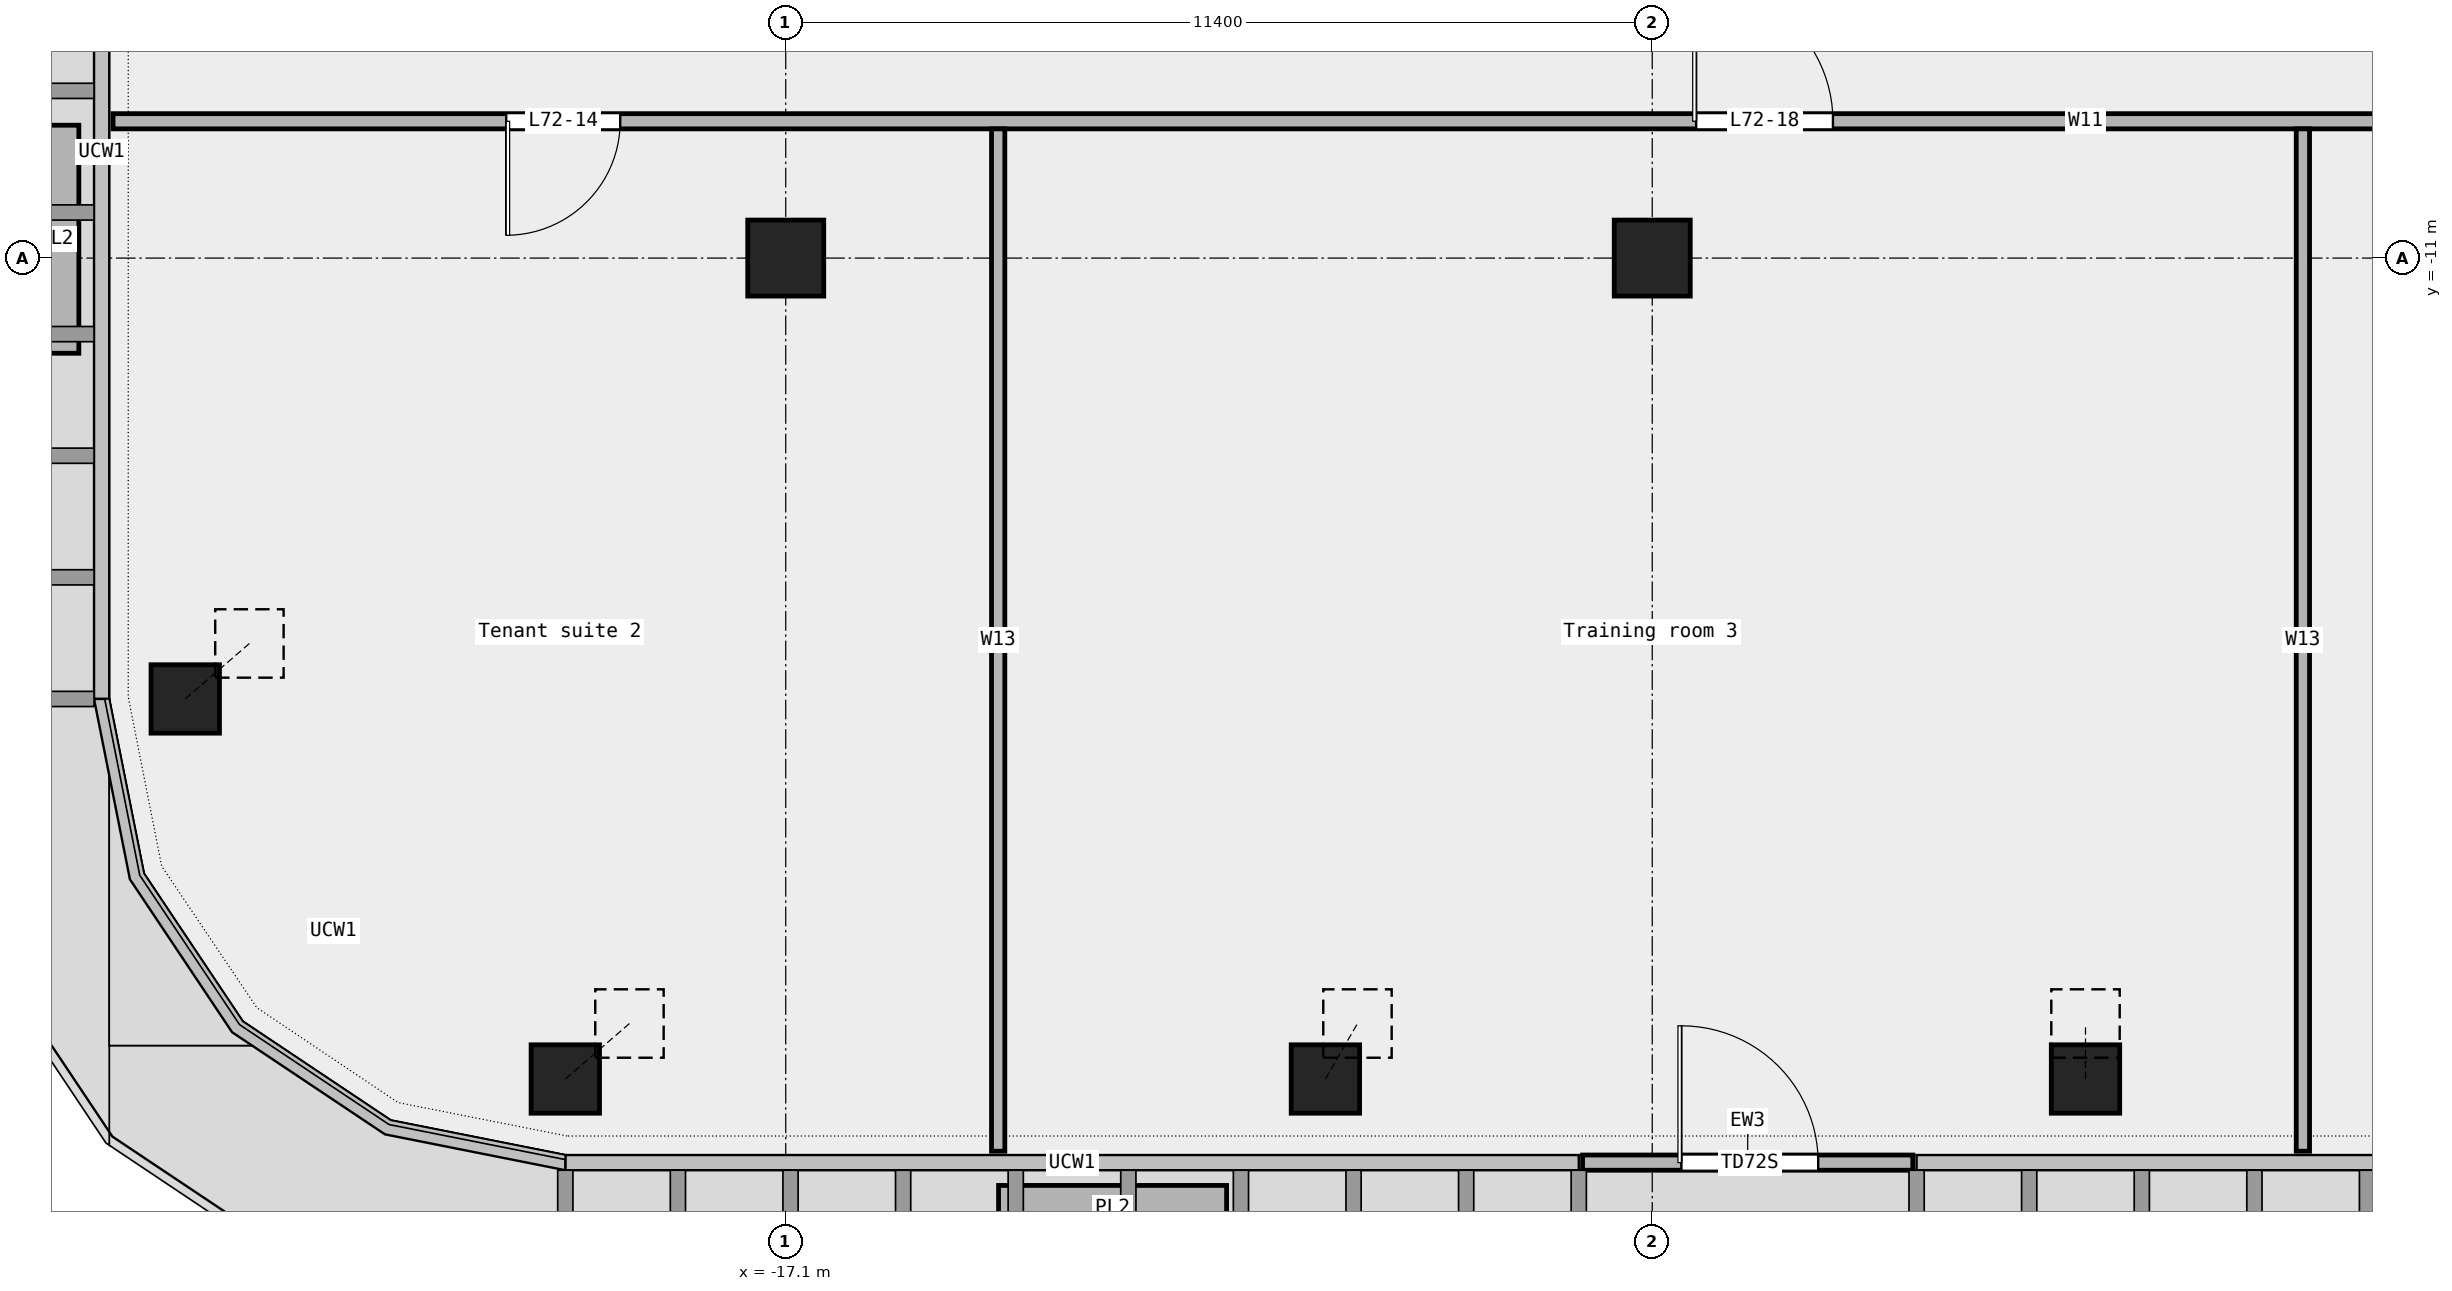
"""IFC4 building model, lengths in metres.
Left out: names, types, materials, properties, quantities, classifications, styles, units other than length and angle.
Written with IfcOpenShell. Run it as: python <this file> out.ifc"""

import sys

from ifc_helpers import new_model, si_unit, direction, frame, frame_2d, origin, origin_2d, place, context, subcontext, project, spatial, rectangle, extrude, element, fill, save


model = new_model("IFC4")
c1 = context("Model", 3, precision=1e-05, world=origin(), true_north=direction((0.0, 1.0)))
c2 = subcontext(c1, "Body", "Model", "MODEL_VIEW")
j1 = project(units=[si_unit("LENGTHUNIT", "METRE"), si_unit("PLANEANGLEUNIT", "RADIAN")], contexts=[c1])
p1 = place(None, origin())
s1 = spatial("IfcSite", under=j1, at=p1, CompositionType="ELEMENT")
p2 = place(p1, origin())
s2 = spatial("IfcBuilding", under=s1, at=p2, CompositionType="ELEMENT")
p3 = place(p2, frame((0.0, 0.0, 329.4)))
s3 = spatial("IfcBuildingStorey", under=s2, at=p3, CompositionType="ELEMENT", Elevation=329.4)
p4 = place(p3, frame((-20.0, -21.8, 0.0), z_axis=(0.221120003964, 0.191249294721, 0.956310436582), x_axis=(-0.654172229665, 0.756345618044, 0.0)))
e1 = element("IfcColumn", 1, at=p4, inside=s3, PredefinedType="COLUMN", context=c2, shape_type="SweptSolid", body=[
    extrude(rectangle(XDim=0.9, YDim=0.9, at=origin_2d()), origin(), (0.0, 0.0, 1.0), 3.817),
])
p5 = place(p3, frame((-10.0, -21.8, 0.0), z_axis=(0.112612491067, 0.194856104335, 0.974345690943), x_axis=(-0.8658093198, 0.500374081811, 0.0)))
e2 = element("IfcColumn", 2, at=p5, inside=s3, PredefinedType="COLUMN", context=c2, shape_type="SweptSolid", body=[
    extrude(rectangle(XDim=0.9, YDim=0.9, at=origin_2d()), origin(), (0.0, 0.0, 1.0), 3.746),
])
p6 = place(p3, frame((0.0, -21.8, 0.0), z_axis=(0.0, 0.196103522341, 0.980583198166), x_axis=(-1.0, 0.0, 0.0)))
e3 = element("IfcColumn", 3, at=p6, inside=s3, PredefinedType="COLUMN", context=c2, shape_type="SweptSolid", body=[
    extrude(rectangle(XDim=0.9, YDim=0.9, at=origin_2d()), origin(), (0.0, 0.0, 1.0), 3.722),
])
p7 = place(p3, frame((-25.0, -16.8, 0.0), z_axis=(0.221120003964, 0.191249294721, 0.956310436582), x_axis=(-0.654172229665, 0.756345618044, 0.0)))
e4 = element("IfcColumn", 4, at=p7, inside=s3, PredefinedType="COLUMN", context=c2, shape_type="SweptSolid", body=[
    extrude(rectangle(XDim=0.9, YDim=0.9, at=origin_2d()), origin(), (0.0, 0.0, 1.0), 3.817),
])
for number, where, z_axis, x_axis in (
    (5, (-17.1, -11.0, 0.0), (0.0, 0.0, 1.0), (1.0, 0.0, 0.0)),
    (6, (-5.7, -11.0, 0.0), (0.0, 0.0, 1.0), (1.0, 0.0, 0.0)),
):
    element("IfcColumn", number, at=place(p3, frame(where, z_axis=z_axis, x_axis=x_axis)), inside=s3, PredefinedType="COLUMN", context=c2, shape_type="SweptSolid", body=[
        extrude(rectangle(XDim=1.0, YDim=1.0, at=origin_2d()), origin(), (0.0, 0.0, 1.0), 3.65),
    ])
p8 = place(p3, frame((-6.617, -22.9, 0.0), z_axis=(0.0, 0.0, 1.0), x_axis=(1.0, 0.0, 0.0)))
e7 = element("IfcWall", 7, at=p8, inside=s3, PredefinedType="STANDARD", context=c2, shape_type="SweptSolid", body=[
    extrude(rectangle(XDim=4.344, YDim=0.2, at=frame_2d((2.172, 0.0))), origin(), (0.0, 0.0, 1.0), 3.65),
])
p9 = place(p8, frame((1.3, 0.0, 0.0)))
e8 = element("IfcOpeningElement", 8, at=p9, cuts=e7, PredefinedType="OPENING", context=c2, shape_type="SweptSolid", body=[
    extrude(rectangle(XDim=1.8, YDim=2.4, at=frame_2d((0.9, 1.2))), frame((0.0, 0.112, 0.0), z_axis=(0.0, -1.0, 0.0), x_axis=(1.0, 0.0, 0.0)), (0.0, 0.0, 1.0), 0.224),
])
for number, where, z_axis, x_axis in (
    (9, (-14.3, -23.5, 0.0), (0.0, 0.0, 1.0), (1.0, 0.0, 0.0)),
    (10, (-26.7, -9.252, 0.0), (0.0, 0.0, 1.0), (0.0, -1.0, 0.0)),
):
    element("IfcWall", number, at=place(p3, frame(where, z_axis=z_axis, x_axis=x_axis)), inside=s3, PredefinedType="STANDARD", context=c2, shape_type="SweptSolid", body=[
        extrude(rectangle(XDim=3.0, YDim=0.6, at=frame_2d((1.5, 0.0))), origin(), (0.0, 0.0, 1.0), 0.7),
    ])
p10 = place(p3, frame((-25.95, -9.2, 0.0), z_axis=(0.0, 0.0, 1.0), x_axis=(1.0, 0.0, 0.0)))
e11 = element("IfcWall", 11, at=p10, inside=s3, PredefinedType="PARTITIONING", context=c2, shape_type="SweptSolid", body=[
    extrude(rectangle(XDim=51.9, YDim=0.2, at=frame_2d((25.95, 0.0))), origin(), (0.0, 0.0, 1.0), 3.65),
])
p11 = place(p10, frame((39.355, 0.0, 0.0)))
e12 = element("IfcOpeningElement", 12, at=p11, cuts=e11, PredefinedType="OPENING", context=c2, shape_type="SweptSolid", body=[
    extrude(rectangle(XDim=1.8, YDim=2.1, at=frame_2d((0.9, 1.05))), frame((0.0, 0.112, 0.0), z_axis=(0.0, -1.0, 0.0), x_axis=(1.0, 0.0, 0.0)), (0.0, 0.0, 1.0), 0.224),
])
p12 = place(p10, frame((5.173, 0.0, 0.0)))
e13 = element("IfcOpeningElement", 13, at=p12, cuts=e11, PredefinedType="OPENING", context=c2, shape_type="SweptSolid", body=[
    extrude(rectangle(XDim=1.5, YDim=2.1, at=frame_2d((0.75, 1.05))), frame((0.0, 0.112, 0.0), z_axis=(0.0, -1.0, 0.0), x_axis=(1.0, 0.0, 0.0)), (0.0, 0.0, 1.0), 0.224),
])
p13 = place(p10, frame((20.827, 0.0, 0.0)))
e14 = element("IfcOpeningElement", 14, at=p13, cuts=e11, PredefinedType="OPENING", context=c2, shape_type="SweptSolid", body=[
    extrude(rectangle(XDim=1.8, YDim=2.1, at=frame_2d((0.9, 1.05))), frame((0.0, 0.112, 0.0), z_axis=(0.0, -1.0, 0.0), x_axis=(1.0, 0.0, 0.0)), (0.0, 0.0, 1.0), 0.224),
])
for number, where, z_axis, x_axis in (
    (15, (-14.305, -22.75, 0.0), (0.0, 0.0, 1.0), (0.0, 1.0, 0.0)),
    (16, (2.86, -22.75, 0.0), (0.0, 0.0, 1.0), (0.0, 1.0, 0.0)),
):
    element("IfcWall", number, at=place(p3, frame(where, z_axis=z_axis, x_axis=x_axis)), inside=s3, PredefinedType="PARTITIONING", context=c2, shape_type="SweptSolid", body=[
        extrude(rectangle(XDim=13.45, YDim=0.175, at=frame_2d((6.725, 0.0))), origin(), (0.0, 0.0, 1.0), 3.65),
    ])
p14 = place(p9, origin())
e17 = element("IfcDoor", 17, at=p14, inside=s3, OperationType="DOUBLE_DOOR_SINGLE_SWING", PredefinedType="DOOR", context=c2, shape_type="SweptSolid", body=[
    extrude(rectangle(XDim=1.8, YDim=2.4, at=frame_2d((0.9, 1.2))), frame((0.0, 0.025, 0.0), z_axis=(0.0, -1.0, 0.0), x_axis=(1.0, 0.0, 0.0)), (0.0, 0.0, 1.0), 0.05),
])
fill(e8, e17)
p15 = place(p12, origin())
e18 = element("IfcDoor", 18, at=p15, inside=s3, OperationType="DOUBLE_DOOR_SINGLE_SWING", PredefinedType="DOOR", context=c2, shape_type="SweptSolid", body=[
    extrude(rectangle(XDim=1.5, YDim=2.1, at=frame_2d((0.75, 1.05))), frame((0.0, 0.025, 0.0), z_axis=(0.0, -1.0, 0.0), x_axis=(1.0, 0.0, 0.0)), (0.0, 0.0, 1.0), 0.05),
])
fill(e13, e18)
p16 = place(p13, origin())
e19 = element("IfcDoor", 19, at=p16, inside=s3, OperationType="DOUBLE_DOOR_SINGLE_SWING", PredefinedType="DOOR", context=c2, shape_type="SweptSolid", body=[
    extrude(rectangle(XDim=1.8, YDim=2.1, at=frame_2d((0.9, 1.05))), frame((0.0, 0.025, 0.0), z_axis=(0.0, -1.0, 0.0), x_axis=(1.0, 0.0, 0.0)), (0.0, 0.0, 1.0), 0.05),
])
fill(e14, e19)
save(model, sys.argv[1])
